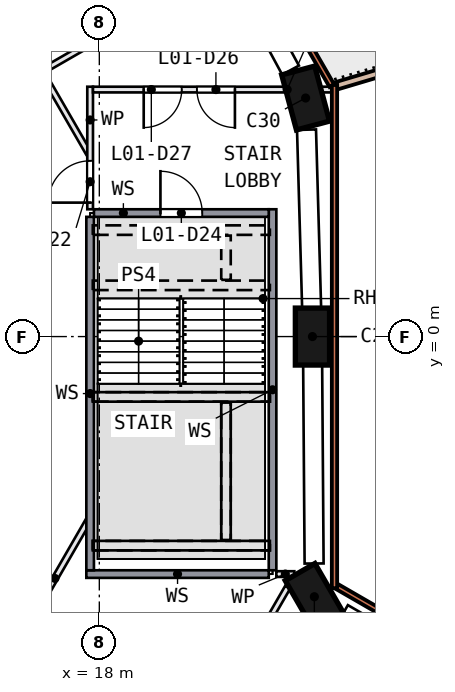
"""IFC4 building model, lengths in metres.
Left out: names, types, materials, properties, quantities, classifications, styles, units other than length and angle.
Written with IfcOpenShell. Run it as: python <this file> out.ifc"""

import sys

from ifc_helpers import new_model, si_unit, direction, frame, frame_2d, origin, origin_2d, place, context, subcontext, project, spatial, polyline, rectangle, outline, extrude, element, fill, save


model = new_model("IFC4")
c1 = context("Model", 3, precision=1e-05, world=origin(), true_north=direction((0.0, 1.0)))
c2 = subcontext(c1, "Body", "Model", "MODEL_VIEW")
j1 = project(units=[si_unit("LENGTHUNIT", "METRE"), si_unit("PLANEANGLEUNIT", "RADIAN")], contexts=[c1])
p1 = place(None, origin())
s1 = spatial("IfcSite", under=j1, at=p1, CompositionType="ELEMENT")
p2 = place(p1, origin())
s2 = spatial("IfcBuilding", under=s1, at=p2, CompositionType="ELEMENT")
p3 = place(p2, frame((0.0, 0.0, 8.0)))
s3 = spatial("IfcBuildingStorey", under=s2, at=p3, CompositionType="ELEMENT", Elevation=8.0)
for number, where, z_axis, x_axis in (
    (1, (23.658, -6.846, 0.0), (0.0, 0.0, 1.0), (0.5, -0.866, 0.0)),
    (2, (23.608, 0.0, 0.0), (0.0, 0.0, 1.0), (0.0, 1.0, 0.0)),
    (3, (23.428, 6.278, 0.0), (0.0, 0.0, 1.0), (0.259, -0.966, 0.0)),
):
    element("IfcColumn", number, at=place(p3, frame(where, z_axis=z_axis, x_axis=x_axis)), inside=s3, PredefinedType="COLUMN", context=c2, shape_type="SweptSolid", body=[
        extrude(rectangle(XDim=1.5, YDim=0.9, at=origin_2d()), origin(), (0.0, 0.0, 1.0), 5.55),
    ])
p4 = place(p3, frame((33.751, -12.062, 0.0), z_axis=(0.0, 0.0, 1.0), x_axis=(-0.86602647, 0.499998154, 0.0)))
e4 = element("IfcWall", 4, at=p4, inside=s3, PredefinedType="SOLIDWALL", context=c2, shape_type="SweptSolid", body=[
    extrude(rectangle(XDim=10.961, YDim=0.14, at=frame_2d((5.481, 0.0))), origin(), (0.0, 0.0, 1.0), 5.55),
])
p5 = place(p4, frame((6.702, 0.0, 0.9)))
e5 = element("IfcOpeningElement", 5, at=p5, cuts=e4, PredefinedType="OPENING", context=c2, shape_type="SweptSolid", body=[
    extrude(rectangle(XDim=3.0, YDim=3.6, at=frame_2d((1.5, 1.8))), frame((0.0, 0.08, 0.0), z_axis=(0.0, -1.0, 0.0), x_axis=(1.0, 0.0, 0.0)), (0.0, 0.0, 1.0), 0.16),
])
p6 = place(p3, frame((24.188, -6.621, 0.0), z_axis=(0.0, 0.0, 1.0), x_axis=(0.0, 1.0, 0.0)))
e6 = element("IfcWall", 6, at=p6, inside=s3, PredefinedType="SOLIDWALL", context=c2, shape_type="SweptSolid", body=[
    extrude(rectangle(XDim=13.242, YDim=0.14, at=frame_2d((6.621, 0.0))), origin(), (0.0, 0.0, 1.0), 5.55),
])
p7 = place(p3, frame((24.118, 6.603, 0.0), z_axis=(0.0, 0.0, 1.0), x_axis=(-0.499997984, 0.866026568, 0.0)))
e7 = element("IfcWall", 7, at=p7, inside=s3, PredefinedType="SOLIDWALL", context=c2, shape_type="SweptSolid", body=[
    extrude(rectangle(XDim=12.962, YDim=0.14, at=frame_2d((6.481, 0.0))), origin(), (0.0, 0.0, 1.0), 5.55),
])
p8 = place(p3, origin())
e8 = element("IfcWall", 8, at=p8, inside=s3, PredefinedType="SOLIDWALL", context=c2, shape_type="SweptSolid", body=[
    extrude(outline(polyline([(24.201, 6.692), (24.258, 6.5), (36.0, 10.0), (35.8, 10.149), (24.201, 6.692)])), origin(), (0.0, 0.0, 1.0), 0.45),
])
p9 = place(p3, frame((16.517, 6.909, 0.0), z_axis=(0.0, 0.0, 1.0), x_axis=(0.499933044, -0.866064057, 0.0)))
e9 = element("IfcWall", 9, at=p9, inside=s3, PredefinedType="PARTITIONING", context=c2, shape_type="SweptSolid", body=[
    extrude(rectangle(XDim=2.408, YDim=0.15, at=frame_2d((1.204, 0.0))), origin(), (0.0, 0.0, 1.0), 5.55),
])
p10 = place(p3, frame((17.658, -6.25, 0.0), z_axis=(0.0, 0.0, 1.0), x_axis=(1.0, 0.0, 0.0)))
e10 = element("IfcWall", 10, at=p10, inside=s3, PredefinedType="SOLIDWALL", context=c2, shape_type="SweptSolid", body=[
    extrude(rectangle(XDim=4.8, YDim=0.2, at=frame_2d((2.4, 0.0))), origin(), (0.0, 0.0, 1.0), 5.55),
])
p11 = place(p3, frame((17.708, -4.845, 0.0), z_axis=(0.0, 0.0, 1.0), x_axis=(-0.499993523, -0.866029143, 0.0)))
e11 = element("IfcWall", 11, at=p11, inside=s3, PredefinedType="PARTITIONING", context=c2, shape_type="SweptSolid", body=[
    extrude(rectangle(XDim=3.508, YDim=0.15, at=frame_2d((1.754, 0.0))), origin(), (0.0, 0.0, 1.0), 5.55),
])
p12 = place(p3, frame((17.758, 3.15, 0.0), z_axis=(0.0, 0.0, 1.0), x_axis=(0.0, -1.0, 0.0)))
e12 = element("IfcWall", 12, at=p12, inside=s3, PredefinedType="SOLIDWALL", context=c2, shape_type="SweptSolid", body=[
    extrude(rectangle(XDim=9.3, YDim=0.2, at=frame_2d((4.65, 0.0))), origin(), (0.0, 0.0, 1.0), 5.55),
])
p13 = place(p3, frame((17.758, 3.35, 0.0), z_axis=(0.0, 0.0, 1.0), x_axis=(0.0, 1.0, 0.0)))
e13 = element("IfcWall", 13, at=p13, inside=s3, PredefinedType="PARTITIONING", context=c2, shape_type="SweptSolid", body=[
    extrude(rectangle(XDim=3.225, YDim=0.15, at=frame_2d((1.613, 0.0))), origin(), (0.0, 0.0, 1.0), 5.55),
])
p14 = place(p13, frame((0.175, 0.0, 0.0)))
e14 = element("IfcOpeningElement", 14, at=p14, cuts=e13, PredefinedType="OPENING", context=c2, shape_type="SweptSolid", body=[
    extrude(rectangle(XDim=1.1, YDim=2.1, at=frame_2d((0.55, 1.05))), frame((0.0, 0.085, 0.0), z_axis=(0.0, -1.0, 0.0), x_axis=(1.0, 0.0, 0.0)), (0.0, 0.0, 1.0), 0.17),
])
p15 = place(p3, frame((20.649, -10.594, 0.0), z_axis=(0.0, 0.0, 1.0), x_axis=(0.499987837, 0.866032426, 0.0)))
e15 = element("IfcWall", 15, at=p15, inside=s3, PredefinedType="PARTITIONING", context=c2, shape_type="SweptSolid", body=[
    extrude(rectangle(XDim=4.619, YDim=0.15, at=frame_2d((2.309, 0.0))), origin(), (0.0, 0.0, 1.0), 5.55),
])
p16 = place(p3, frame((21.987, 10.154, 0.0), z_axis=(0.0, 0.0, 1.0), x_axis=(-0.866032921, -0.49998698, 0.0)))
e16 = element("IfcWall", 16, at=p16, inside=s3, PredefinedType="PARTITIONING", context=c2, shape_type="SweptSolid", body=[
    extrude(rectangle(XDim=6.285, YDim=0.15, at=frame_2d((3.143, 0.0))), origin(), (0.0, 0.0, 1.0), 5.55),
])
p17 = place(p3, frame((22.558, -6.15, 0.0), z_axis=(0.0, 0.0, 1.0), x_axis=(0.0, 1.0, 0.0)))
e17 = element("IfcWall", 17, at=p17, inside=s3, PredefinedType="SOLIDWALL", context=c2, shape_type="SweptSolid", body=[
    extrude(rectangle(XDim=9.5, YDim=0.2, at=frame_2d((4.75, 0.0))), origin(), (0.0, 0.0, 1.0), 5.55),
])
p18 = place(p3, frame((22.658, -6.25, 0.0), z_axis=(0.0, 0.0, 1.0), x_axis=(1.0, 0.0, 0.0)))
e18 = element("IfcWall", 18, at=p18, inside=s3, PredefinedType="PARTITIONING", context=c2, shape_type="SweptSolid", body=[
    extrude(rectangle(XDim=0.473, YDim=0.15, at=frame_2d((0.237, 0.0))), origin(), (0.0, 0.0, 1.0), 5.55),
])
p19 = place(p3, frame((17.858, 3.25, 0.0), z_axis=(0.0, 0.0, 1.0), x_axis=(1.0, 0.0, 0.0)))
e19 = element("IfcWall", 19, at=p19, inside=s3, PredefinedType="SOLIDWALL", context=c2, shape_type="SweptSolid", body=[
    extrude(rectangle(XDim=4.6, YDim=0.2, at=frame_2d((2.3, 0.0))), origin(), (0.0, 0.0, 1.0), 5.55),
])
p20 = place(p19, frame((1.75, 0.0, 0.0)))
e20 = element("IfcOpeningElement", 20, at=p20, cuts=e19, PredefinedType="OPENING", context=c2, shape_type="SweptSolid", body=[
    extrude(rectangle(XDim=1.1, YDim=2.1, at=frame_2d((0.55, 1.05))), frame((0.0, 0.11, 0.0), z_axis=(0.0, -1.0, 0.0), x_axis=(1.0, 0.0, 0.0)), (0.0, 0.0, 1.0), 0.22),
])
p21 = place(p3, frame((24.118, 6.5, 0.0), z_axis=(0.0, 0.0, 1.0), x_axis=(-1.0, 0.0, 0.0)))
e21 = element("IfcWall", 21, at=p21, inside=s3, PredefinedType="PARTITIONING", context=c2, shape_type="SweptSolid", body=[
    extrude(rectangle(XDim=6.285, YDim=0.15, at=frame_2d((3.143, 0.0))), origin(), (0.0, 0.0, 1.0), 5.55),
])
p22 = place(p21, frame((2.55, 0.0, 0.0)))
e22 = element("IfcOpeningElement", 22, at=p22, cuts=e21, PredefinedType="OPENING", context=c2, shape_type="SweptSolid", body=[
    extrude(rectangle(XDim=1.0, YDim=2.1, at=frame_2d((0.5, 1.05))), frame((0.0, 0.085, 0.0), z_axis=(0.0, -1.0, 0.0), x_axis=(1.0, 0.0, 0.0)), (0.0, 0.0, 1.0), 0.17),
])
p23 = place(p21, frame((3.95, 0.0, 0.0)))
e23 = element("IfcOpeningElement", 23, at=p23, cuts=e21, PredefinedType="OPENING", context=c2, shape_type="SweptSolid", body=[
    extrude(rectangle(XDim=1.0, YDim=2.1, at=frame_2d((0.5, 1.05))), frame((0.0, 0.085, 0.0), z_axis=(0.0, -1.0, 0.0), x_axis=(1.0, 0.0, 0.0)), (0.0, 0.0, 1.0), 0.17),
])
p24 = place(p14, origin())
e24 = element("IfcDoor", 24, at=p24, inside=s3, OperationType="SINGLE_SWING_LEFT", PredefinedType="DOOR", context=c2, shape_type="SweptSolid", body=[
    extrude(rectangle(XDim=1.1, YDim=2.1, at=frame_2d((0.55, 1.05))), frame((0.0, 0.025, 0.0), z_axis=(0.0, -1.0, 0.0), x_axis=(1.0, 0.0, 0.0)), (0.0, 0.0, 1.0), 0.05),
])
fill(e14, e24)
p25 = place(p20, origin())
e25 = element("IfcDoor", 25, at=p25, inside=s3, OperationType="SINGLE_SWING_LEFT", PredefinedType="DOOR", context=c2, shape_type="SweptSolid", body=[
    extrude(rectangle(XDim=1.1, YDim=2.1, at=frame_2d((0.55, 1.05))), frame((0.0, 0.025, 0.0), z_axis=(0.0, -1.0, 0.0), x_axis=(1.0, 0.0, 0.0)), (0.0, 0.0, 1.0), 0.05),
])
fill(e20, e25)
p26 = place(p22, origin())
e26 = element("IfcDoor", 26, at=p26, inside=s3, OperationType="SINGLE_SWING_LEFT", PredefinedType="DOOR", context=c2, shape_type="SweptSolid", body=[
    extrude(rectangle(XDim=1.0, YDim=2.1, at=frame_2d((0.5, 1.05))), frame((0.0, 0.025, 0.0), z_axis=(0.0, -1.0, 0.0), x_axis=(1.0, 0.0, 0.0)), (0.0, 0.0, 1.0), 0.05),
])
fill(e22, e26)
p27 = place(p23, origin())
e27 = element("IfcDoor", 27, at=p27, inside=s3, OperationType="SINGLE_SWING_RIGHT", PredefinedType="DOOR", context=c2, shape_type="SweptSolid", body=[
    extrude(rectangle(XDim=1.0, YDim=2.1, at=frame_2d((0.5, 1.05))), frame((0.0, 0.025, 0.0), z_axis=(0.0, -1.0, 0.0), x_axis=(1.0, 0.0, 0.0)), (0.0, 0.0, 1.0), 0.05),
])
fill(e23, e27)
save(model, sys.argv[1])
